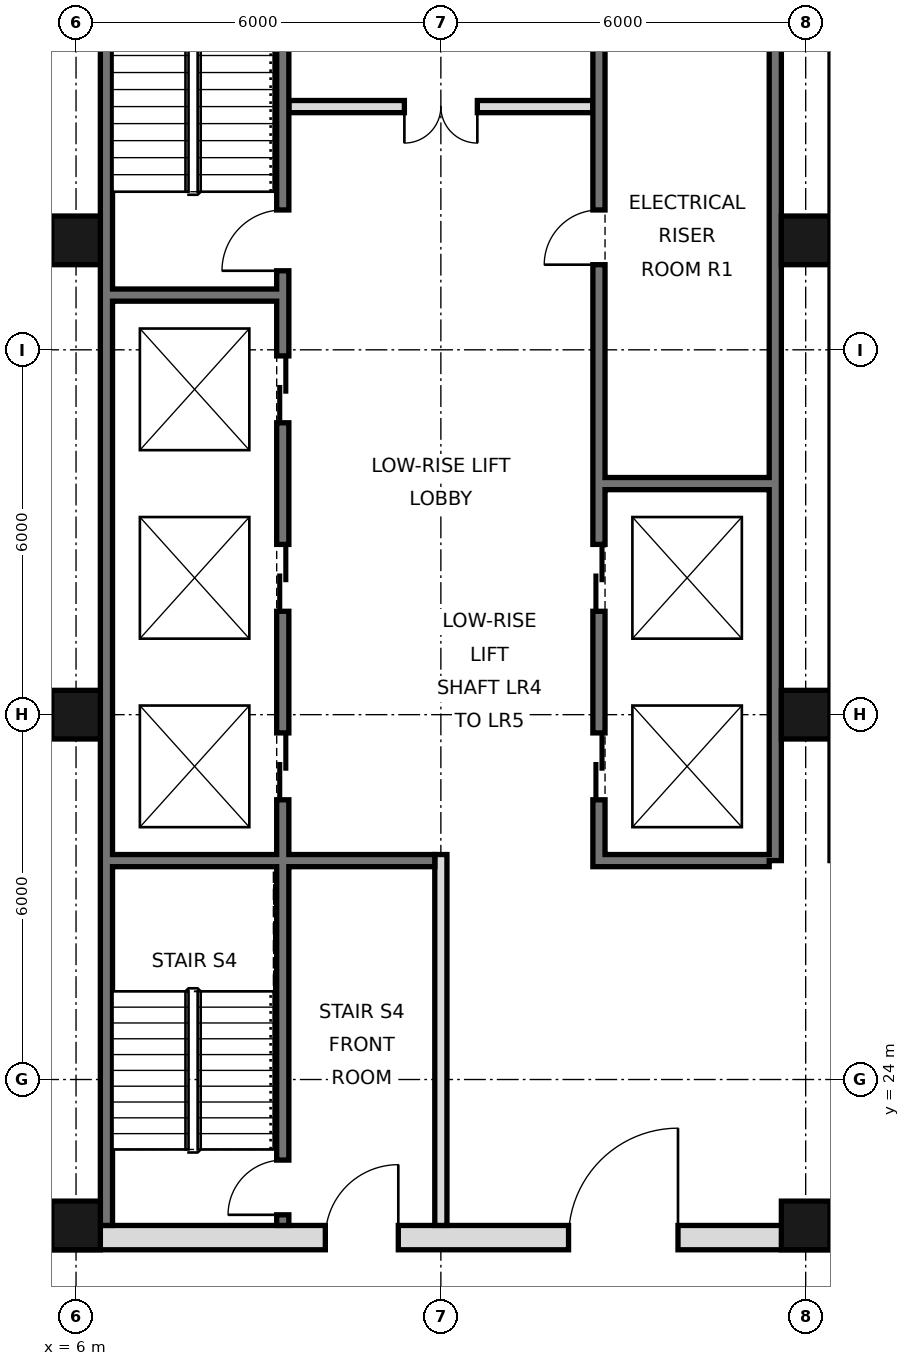
"""IFC4 building model, lengths in metres.
Left out: names, types, materials, properties, quantities, classifications, styles, units other than length and angle.
Written with IfcOpenShell. Run it as: python <this file> out.ifc"""

import sys

from ifc_helpers import new_model, si_unit, direction, frame, frame_2d, origin, origin_2d, place, context, subcontext, project, spatial, rectangle, hollow_rectangle, extrude, element, fill, save


model = new_model("IFC4")
c1 = context("Model", 3, precision=1e-05, world=origin(), true_north=direction((0.0, 1.0)))
c2 = subcontext(c1, "Body", "Model", "MODEL_VIEW")
j1 = project(units=[si_unit("LENGTHUNIT", "METRE"), si_unit("PLANEANGLEUNIT", "RADIAN")], contexts=[c1])
p1 = place(None, origin())
s1 = spatial("IfcSite", under=j1, at=p1, CompositionType="ELEMENT")
p2 = place(p1, origin())
s2 = spatial("IfcBuilding", under=s1, at=p2, CompositionType="ELEMENT")
p3 = place(p2, frame((0.0, 0.0, 78.6)))
s3 = spatial("IfcBuildingStorey", under=s2, at=p3, CompositionType="ELEMENT", Elevation=78.6)
for number, where, z_axis, x_axis in (
    (1, (6.0, 21.6, 0.0), (0.0, 0.0, 1.0), (1.0, 0.0, 0.0)),
    (2, (6.0, 30.0, 0.0), (0.0, 0.0, 1.0), (1.0, 0.0, 0.0)),
    (3, (6.0, 37.8, 0.0), (0.0, 0.0, 1.0), (1.0, 0.0, 0.0)),
    (4, (18.0, 21.6, 0.0), (0.0, 0.0, 1.0), (1.0, 0.0, 0.0)),
    (5, (18.0, 30.0, 0.0), (0.0, 0.0, 1.0), (1.0, 0.0, 0.0)),
    (6, (18.0, 37.8, 0.0), (0.0, 0.0, 1.0), (1.0, 0.0, 0.0)),
):
    element("IfcColumn", number, at=place(p3, frame(where, z_axis=z_axis, x_axis=x_axis)), inside=s3, PredefinedType="COLUMN", context=c2, shape_type="SweptSolid", body=[
        extrude(hollow_rectangle(XDim=0.8, YDim=0.8, WallThickness=0.06, at=origin_2d()), origin(), (0.0, 0.0, 1.0), 3.6),
    ])
p4 = place(p3, frame((6.5, 21.6, 0.0), z_axis=(0.0, 0.0, 1.0), x_axis=(0.0, 1.0, 0.0)))
e7 = element("IfcWall", 7, at=p4, inside=s3, PredefinedType="SOLIDWALL", context=c2, shape_type="SweptSolid", body=[
    extrude(rectangle(XDim=23.5, YDim=0.2, at=frame_2d((11.75, 0.0))), origin(), (0.0, 0.0, 1.0), 3.42),
])
p5 = place(p3, frame((17.5, 27.6, 0.0), z_axis=(0.0, 0.0, 1.0), x_axis=(0.0, 1.0, 0.0)))
e8 = element("IfcWall", 8, at=p5, inside=s3, PredefinedType="SOLIDWALL", context=c2, shape_type="SweptSolid", body=[
    extrude(rectangle(XDim=17.5, YDim=0.2, at=frame_2d((8.75, 0.0))), origin(), (0.0, 0.0, 1.0), 3.42),
])
p6 = place(p3, frame((5.6, 21.4, 0.0), z_axis=(0.0, 0.0, 1.0), x_axis=(1.0, 0.0, 0.0)))
e9 = element("IfcWall", 9, at=p6, inside=s3, PredefinedType="SOLIDWALL", context=c2, shape_type="SweptSolid", body=[
    extrude(rectangle(XDim=36.8, YDim=0.4, at=frame_2d((18.4, 0.0))), origin(), (0.0, 0.0, 1.0), 3.42),
])
p7 = place(p6, frame((8.5, 0.0, 0.0)))
e10 = element("IfcOpeningElement", 10, at=p7, cuts=e9, PredefinedType="OPENING", context=c2, shape_type="SweptSolid", body=[
    extrude(rectangle(XDim=1.8, YDim=2.1, at=frame_2d((0.9, 1.05))), frame((0.0, 0.21, 0.0), z_axis=(0.0, -1.0, 0.0), x_axis=(1.0, 0.0, 0.0)), (0.0, 0.0, 1.0), 0.42),
])
p8 = place(p6, frame((17.5, 0.0, 0.0)))
e11 = element("IfcOpeningElement", 11, at=p8, cuts=e9, PredefinedType="OPENING", context=c2, shape_type="SweptSolid", body=[
    extrude(rectangle(XDim=1.8, YDim=2.1, at=frame_2d((0.9, 1.05))), frame((0.0, 0.21, 0.0), z_axis=(0.0, -1.0, 0.0), x_axis=(1.0, 0.0, 0.0)), (0.0, 0.0, 1.0), 0.42),
])
p9 = place(p6, frame((26.5, 0.0, 0.0)))
e12 = element("IfcOpeningElement", 12, at=p9, cuts=e9, PredefinedType="OPENING", context=c2, shape_type="SweptSolid", body=[
    extrude(rectangle(XDim=1.8, YDim=2.1, at=frame_2d((0.9, 1.05))), frame((0.0, 0.21, 0.0), z_axis=(0.0, -1.0, 0.0), x_axis=(1.0, 0.0, 0.0)), (0.0, 0.0, 1.0), 0.42),
])
p10 = place(p6, frame((4.5, 0.0, 0.0)))
e13 = element("IfcOpeningElement", 13, at=p10, cuts=e9, PredefinedType="OPENING", context=c2, shape_type="SweptSolid", body=[
    extrude(rectangle(XDim=1.2, YDim=2.1, at=frame_2d((0.6, 1.05))), frame((0.0, 0.21, 0.0), z_axis=(0.0, -1.0, 0.0), x_axis=(1.0, 0.0, 0.0)), (0.0, 0.0, 1.0), 0.42),
])
p11 = place(p6, frame((31.1, 0.0, 0.0)))
e14 = element("IfcOpeningElement", 14, at=p11, cuts=e9, PredefinedType="OPENING", context=c2, shape_type="SweptSolid", body=[
    extrude(rectangle(XDim=1.2, YDim=2.1, at=frame_2d((0.6, 1.05))), frame((0.0, 0.21, 0.0), z_axis=(0.0, -1.0, 0.0), x_axis=(1.0, 0.0, 0.0)), (0.0, 0.0, 1.0), 0.42),
])
p12 = place(p3, frame((12.0, 21.6, 0.0), z_axis=(0.0, 0.0, 1.0), x_axis=(0.0, 1.0, 0.0)))
e15 = element("IfcWall", 15, at=p12, inside=s3, PredefinedType="PARTITIONING", context=c2, shape_type="SweptSolid", body=[
    extrude(rectangle(XDim=6.1, YDim=0.2, at=frame_2d((3.05, 0.0))), origin(), (0.0, 0.0, 1.0), 3.42),
])
p13 = place(p3, frame((14.6, 27.5, 0.0), z_axis=(0.0, 0.0, 1.0), x_axis=(0.0, 1.0, 0.0)))
e16 = element("IfcWall", 16, at=p13, inside=s3, PredefinedType="SOLIDWALL", context=c2, shape_type="SweptSolid", body=[
    extrude(rectangle(XDim=17.5, YDim=0.2, at=frame_2d((8.75, 0.0))), origin(), (0.0, 0.0, 1.0), 3.42),
])
p14 = place(p13, frame((1.1, 0.0, 0.0)))
e17 = element("IfcOpeningElement", 17, at=p14, cuts=e16, PredefinedType="OPENING", context=c2, shape_type="SweptSolid", body=[
    extrude(rectangle(XDim=1.1, YDim=2.1, at=frame_2d((0.55, 1.05))), frame((0.0, 0.11, 0.0), z_axis=(0.0, -1.0, 0.0), x_axis=(1.0, 0.0, 0.0)), (0.0, 0.0, 1.0), 0.22),
])
p15 = place(p13, frame((4.2, 0.0, 0.0)))
e18 = element("IfcOpeningElement", 18, at=p15, cuts=e16, PredefinedType="OPENING", context=c2, shape_type="SweptSolid", body=[
    extrude(rectangle(XDim=1.1, YDim=2.1, at=frame_2d((0.55, 1.05))), frame((0.0, 0.11, 0.0), z_axis=(0.0, -1.0, 0.0), x_axis=(1.0, 0.0, 0.0)), (0.0, 0.0, 1.0), 0.22),
])
p16 = place(p13, frame((15.4, 0.0, 0.0)))
e19 = element("IfcOpeningElement", 19, at=p16, cuts=e16, PredefinedType="OPENING", context=c2, shape_type="SweptSolid", body=[
    extrude(rectangle(XDim=1.1, YDim=2.1, at=frame_2d((0.55, 1.05))), frame((0.0, 0.11, 0.0), z_axis=(0.0, -1.0, 0.0), x_axis=(1.0, 0.0, 0.0)), (0.0, 0.0, 1.0), 0.22),
])
p17 = place(p13, frame((9.9, 0.0, 0.0)))
e20 = element("IfcOpeningElement", 20, at=p17, cuts=e16, PredefinedType="OPENING", context=c2, shape_type="SweptSolid", body=[
    extrude(rectangle(XDim=0.9, YDim=2.1, at=frame_2d((0.45, 1.05))), frame((0.0, 0.11, 0.0), z_axis=(0.0, -1.0, 0.0), x_axis=(1.0, 0.0, 0.0)), (0.0, 0.0, 1.0), 0.22),
])
p18 = place(p3, frame((9.4, 21.6, 0.0), z_axis=(0.0, 0.0, 1.0), x_axis=(0.0, 1.0, 0.0)))
e21 = element("IfcWall", 21, at=p18, inside=s3, PredefinedType="SOLIDWALL", context=c2, shape_type="SweptSolid", body=[
    extrude(rectangle(XDim=23.4, YDim=0.2, at=frame_2d((11.7, 0.0))), origin(), (0.0, 0.0, 1.0), 3.42),
])
p19 = place(p18, frame((7.0, 0.0, 0.0)))
e22 = element("IfcOpeningElement", 22, at=p19, cuts=e21, PredefinedType="OPENING", context=c2, shape_type="SweptSolid", body=[
    extrude(rectangle(XDim=1.1, YDim=2.1, at=frame_2d((0.55, 1.05))), frame((0.0, 0.11, 0.0), z_axis=(0.0, -1.0, 0.0), x_axis=(1.0, 0.0, 0.0)), (0.0, 0.0, 1.0), 0.22),
])
p20 = place(p18, frame((10.1, 0.0, 0.0)))
e23 = element("IfcOpeningElement", 23, at=p20, cuts=e21, PredefinedType="OPENING", context=c2, shape_type="SweptSolid", body=[
    extrude(rectangle(XDim=1.1, YDim=2.1, at=frame_2d((0.55, 1.05))), frame((0.0, 0.11, 0.0), z_axis=(0.0, -1.0, 0.0), x_axis=(1.0, 0.0, 0.0)), (0.0, 0.0, 1.0), 0.22),
])
p21 = place(p18, frame((13.2, 0.0, 0.0)))
e24 = element("IfcOpeningElement", 24, at=p21, cuts=e21, PredefinedType="OPENING", context=c2, shape_type="SweptSolid", body=[
    extrude(rectangle(XDim=1.1, YDim=2.1, at=frame_2d((0.55, 1.05))), frame((0.0, 0.11, 0.0), z_axis=(0.0, -1.0, 0.0), x_axis=(1.0, 0.0, 0.0)), (0.0, 0.0, 1.0), 0.22),
])
p22 = place(p18, frame((15.7, 0.0, 0.0)))
e25 = element("IfcOpeningElement", 25, at=p22, cuts=e21, PredefinedType="OPENING", context=c2, shape_type="SweptSolid", body=[
    extrude(rectangle(XDim=1.0, YDim=2.1, at=frame_2d((0.5, 1.05))), frame((0.0, 0.11, 0.0), z_axis=(0.0, -1.0, 0.0), x_axis=(1.0, 0.0, 0.0)), (0.0, 0.0, 1.0), 0.22),
])
p23 = place(p18, frame((0.175, 0.0, 0.0)))
e26 = element("IfcOpeningElement", 26, at=p23, cuts=e21, PredefinedType="OPENING", context=c2, shape_type="SweptSolid", body=[
    extrude(rectangle(XDim=0.9, YDim=2.1, at=frame_2d((0.45, 1.05))), frame((0.0, 0.11, 0.0), z_axis=(0.0, -1.0, 0.0), x_axis=(1.0, 0.0, 0.0)), (0.0, 0.0, 1.0), 0.22),
])
p24 = place(p3, frame((14.7, 27.6, 0.0), z_axis=(0.0, 0.0, 1.0), x_axis=(1.0, 0.0, 0.0)))
e27 = element("IfcWall", 27, at=p24, inside=s3, PredefinedType="SOLIDWALL", context=c2, shape_type="SweptSolid", body=[
    extrude(rectangle(XDim=2.7, YDim=0.2, at=frame_2d((1.35, 0.0))), origin(), (0.0, 0.0, 1.0), 3.42),
])
p25 = place(p3, frame((6.6, 27.6, 0.0), z_axis=(0.0, 0.0, 1.0), x_axis=(1.0, 0.0, 0.0)))
e28 = element("IfcWall", 28, at=p25, inside=s3, PredefinedType="SOLIDWALL", context=c2, shape_type="SweptSolid", body=[
    extrude(rectangle(XDim=5.3, YDim=0.2, at=frame_2d((2.65, 0.0))), origin(), (0.0, 0.0, 1.0), 3.42),
])
for number, where, z_axis, x_axis in (
    (29, (14.7, 33.8, 0.0), (0.0, 0.0, 1.0), (1.0, 0.0, 0.0)),
    (30, (6.6, 36.9, 0.0), (0.0, 0.0, 1.0), (1.0, 0.0, 0.0)),
):
    element("IfcWall", number, at=place(p3, frame(where, z_axis=z_axis, x_axis=x_axis)), inside=s3, PredefinedType="SOLIDWALL", context=c2, shape_type="SweptSolid", body=[
        extrude(rectangle(XDim=2.7, YDim=0.2, at=frame_2d((1.35, 0.0))), origin(), (0.0, 0.0, 1.0), 3.42),
    ])
p26 = place(p3, frame((9.5, 40.0, 0.0), z_axis=(0.0, 0.0, 1.0), x_axis=(1.0, 0.0, 0.0)))
e31 = element("IfcWall", 31, at=p26, inside=s3, PredefinedType="PARTITIONING", context=c2, shape_type="SweptSolid", body=[
    extrude(rectangle(XDim=5.0, YDim=0.2, at=frame_2d((2.5, 0.0))), origin(), (0.0, 0.0, 1.0), 3.42),
])
p27 = place(p26, frame((1.9, 0.0, 0.0)))
e32 = element("IfcOpeningElement", 32, at=p27, cuts=e31, PredefinedType="OPENING", context=c2, shape_type="SweptSolid", body=[
    extrude(rectangle(XDim=1.2, YDim=2.1, at=frame_2d((0.6, 1.05))), frame((0.0, 0.11, 0.0), z_axis=(0.0, -1.0, 0.0), x_axis=(1.0, 0.0, 0.0)), (0.0, 0.0, 1.0), 0.22),
])
p28 = place(p7, frame((1.8, 0.0, 0.0), z_axis=(0.0, 0.0, 1.0), x_axis=(-1.0, 0.0, 0.0)))
e33 = element("IfcDoor", 33, at=p28, inside=s3, OperationType="SINGLE_SWING_LEFT", PredefinedType="DOOR", context=c2, shape_type="SweptSolid", body=[
    extrude(rectangle(XDim=1.8, YDim=2.1, at=frame_2d((0.9, 1.05))), frame((0.0, 0.025, 0.0), z_axis=(0.0, -1.0, 0.0), x_axis=(1.0, 0.0, 0.0)), (0.0, 0.0, 1.0), 0.05),
])
fill(e10, e33)
p29 = place(p10, frame((1.2, 0.0, 0.0), z_axis=(0.0, 0.0, 1.0), x_axis=(-1.0, 0.0, 0.0)))
e34 = element("IfcDoor", 34, at=p29, inside=s3, OperationType="SINGLE_SWING_LEFT", PredefinedType="DOOR", context=c2, shape_type="SweptSolid", body=[
    extrude(rectangle(XDim=1.2, YDim=2.1, at=frame_2d((0.6, 1.05))), frame((0.0, 0.025, 0.0), z_axis=(0.0, -1.0, 0.0), x_axis=(1.0, 0.0, 0.0)), (0.0, 0.0, 1.0), 0.05),
])
fill(e13, e34)
p30 = place(p27, frame((1.2, 0.0, 0.0), z_axis=(0.0, 0.0, 1.0), x_axis=(-1.0, 0.0, 0.0)))
e35 = element("IfcDoor", 35, at=p30, inside=s3, OperationType="DOUBLE_DOOR_SINGLE_SWING", PredefinedType="DOOR", context=c2, shape_type="SweptSolid", body=[
    extrude(rectangle(XDim=1.2, YDim=2.1, at=frame_2d((0.6, 1.05))), frame((0.0, 0.025, 0.0), z_axis=(0.0, -1.0, 0.0), x_axis=(1.0, 0.0, 0.0)), (0.0, 0.0, 1.0), 0.05),
])
fill(e32, e35)
p31 = place(p14, origin())
e36 = element("IfcDoor", 36, at=p31, inside=s3, OperationType="DOUBLE_DOOR_SLIDING", PredefinedType="DOOR", context=c2, shape_type="SweptSolid", body=[
    extrude(rectangle(XDim=1.1, YDim=2.1, at=frame_2d((0.55, 1.05))), frame((0.0, 0.025, 0.0), z_axis=(0.0, -1.0, 0.0), x_axis=(1.0, 0.0, 0.0)), (0.0, 0.0, 1.0), 0.05),
])
fill(e17, e36)
p32 = place(p15, origin())
e37 = element("IfcDoor", 37, at=p32, inside=s3, OperationType="DOUBLE_DOOR_SLIDING", PredefinedType="DOOR", context=c2, shape_type="SweptSolid", body=[
    extrude(rectangle(XDim=1.1, YDim=2.1, at=frame_2d((0.55, 1.05))), frame((0.0, 0.025, 0.0), z_axis=(0.0, -1.0, 0.0), x_axis=(1.0, 0.0, 0.0)), (0.0, 0.0, 1.0), 0.05),
])
fill(e18, e37)
p33 = place(p19, origin())
e38 = element("IfcDoor", 38, at=p33, inside=s3, OperationType="DOUBLE_DOOR_SLIDING", PredefinedType="DOOR", context=c2, shape_type="SweptSolid", body=[
    extrude(rectangle(XDim=1.1, YDim=2.1, at=frame_2d((0.55, 1.05))), frame((0.0, 0.025, 0.0), z_axis=(0.0, -1.0, 0.0), x_axis=(1.0, 0.0, 0.0)), (0.0, 0.0, 1.0), 0.05),
])
fill(e22, e38)
p34 = place(p20, origin())
e39 = element("IfcDoor", 39, at=p34, inside=s3, OperationType="DOUBLE_DOOR_SLIDING", PredefinedType="DOOR", context=c2, shape_type="SweptSolid", body=[
    extrude(rectangle(XDim=1.1, YDim=2.1, at=frame_2d((0.55, 1.05))), frame((0.0, 0.025, 0.0), z_axis=(0.0, -1.0, 0.0), x_axis=(1.0, 0.0, 0.0)), (0.0, 0.0, 1.0), 0.05),
])
fill(e23, e39)
p35 = place(p21, origin())
e40 = element("IfcDoor", 40, at=p35, inside=s3, OperationType="DOUBLE_DOOR_SLIDING", PredefinedType="DOOR", context=c2, shape_type="SweptSolid", body=[
    extrude(rectangle(XDim=1.1, YDim=2.1, at=frame_2d((0.55, 1.05))), frame((0.0, 0.025, 0.0), z_axis=(0.0, -1.0, 0.0), x_axis=(1.0, 0.0, 0.0)), (0.0, 0.0, 1.0), 0.05),
])
fill(e24, e40)
p36 = place(p22, origin())
e41 = element("IfcDoor", 41, at=p36, inside=s3, OperationType="SINGLE_SWING_LEFT", PredefinedType="DOOR", context=c2, shape_type="SweptSolid", body=[
    extrude(rectangle(XDim=1.0, YDim=2.1, at=frame_2d((0.5, 1.05))), frame((0.0, 0.025, 0.0), z_axis=(0.0, -1.0, 0.0), x_axis=(1.0, 0.0, 0.0)), (0.0, 0.0, 1.0), 0.05),
])
fill(e25, e41)
p37 = place(p23, origin())
e42 = element("IfcDoor", 42, at=p37, inside=s3, OperationType="SINGLE_SWING_LEFT", PredefinedType="DOOR", context=c2, shape_type="SweptSolid", body=[
    extrude(rectangle(XDim=0.9, YDim=2.1, at=frame_2d((0.45, 1.05))), frame((0.0, 0.025, 0.0), z_axis=(0.0, -1.0, 0.0), x_axis=(1.0, 0.0, 0.0)), (0.0, 0.0, 1.0), 0.05),
])
fill(e26, e42)
p38 = place(p17, origin())
e43 = element("IfcDoor", 43, at=p38, inside=s3, OperationType="SINGLE_SWING_LEFT", PredefinedType="DOOR", context=c2, shape_type="SweptSolid", body=[
    extrude(rectangle(XDim=0.9, YDim=2.1, at=frame_2d((0.45, 1.05))), frame((0.0, 0.025, 0.0), z_axis=(0.0, -1.0, 0.0), x_axis=(1.0, 0.0, 0.0)), (0.0, 0.0, 1.0), 0.05),
])
fill(e20, e43)
save(model, sys.argv[1])
